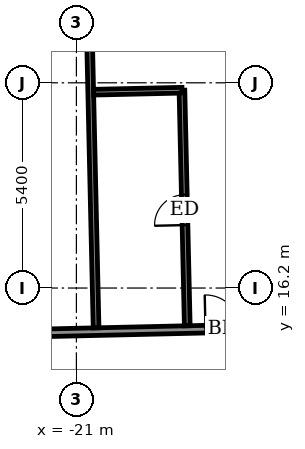
"""IFC4 building model, lengths in metres.
Left out: names, types, materials, properties, quantities, classifications, styles, units other than length and angle.
Written with IfcOpenShell. Run it as: python <this file> out.ifc"""

import sys

from ifc_helpers import new_model, si_unit, direction, frame, frame_2d, origin, place, context, subcontext, project, spatial, rectangle, extrude, element, fill, save


model = new_model("IFC4")
c1 = context("Model", 3, precision=1e-05, world=origin(), true_north=direction((0.0, 1.0)))
c2 = subcontext(c1, "Body", "Model", "MODEL_VIEW")
j1 = project(units=[si_unit("LENGTHUNIT", "METRE"), si_unit("PLANEANGLEUNIT", "RADIAN")], contexts=[c1])
p1 = place(None, origin())
s1 = spatial("IfcSite", under=j1, at=p1, CompositionType="ELEMENT")
p2 = place(p1, origin())
s2 = spatial("IfcBuilding", under=s1, at=p2, CompositionType="ELEMENT")
p3 = place(p2, frame((0.0, 0.0, 290.7)))
s3 = spatial("IfcBuildingStorey", under=s2, at=p3, CompositionType="ELEMENT", Elevation=290.7)
p4 = place(p3, frame((-26.401, 14.918, 0.0), z_axis=(0.0, 0.0, 1.0), x_axis=(0.99974239733, 0.022696673341, 0.0)))
e1 = element("IfcWall", 1, at=p4, inside=s3, PredefinedType="PARTITIONING", context=c2, shape_type="SweptSolid", body=[
    extrude(rectangle(XDim=55.386, YDim=0.2, at=frame_2d((27.693, 0.0))), origin(), (0.0, 0.0, 1.0), 3.05),
])
p5 = place(p4, frame((53.718, 0.0, 0.0)))
e2 = element("IfcOpeningElement", 2, at=p5, cuts=e1, PredefinedType="OPENING", context=c2, shape_type="SweptSolid", body=[
    extrude(rectangle(XDim=1.0, YDim=2.1, at=frame_2d((0.5, 1.05))), frame((0.0, 0.11, 0.0), z_axis=(0.0, -1.0, 0.0), x_axis=(1.0, 0.0, 0.0)), (0.0, 0.0, 1.0), 0.22),
])
p6 = place(p4, frame((49.325, 0.0, 0.0)))
e3 = element("IfcOpeningElement", 3, at=p6, cuts=e1, PredefinedType="OPENING", context=c2, shape_type="SweptSolid", body=[
    extrude(rectangle(XDim=0.9, YDim=2.1, at=frame_2d((0.45, 1.05))), frame((0.0, 0.11, 0.0), z_axis=(0.0, -1.0, 0.0), x_axis=(1.0, 0.0, 0.0)), (0.0, 0.0, 1.0), 0.22),
])
p7 = place(p4, frame((44.575, 0.0, 0.0)))
e4 = element("IfcOpeningElement", 4, at=p7, cuts=e1, PredefinedType="OPENING", context=c2, shape_type="SweptSolid", body=[
    extrude(rectangle(XDim=0.9, YDim=2.1, at=frame_2d((0.45, 1.05))), frame((0.0, 0.11, 0.0), z_axis=(0.0, -1.0, 0.0), x_axis=(1.0, 0.0, 0.0)), (0.0, 0.0, 1.0), 0.22),
])
p8 = place(p4, frame((42.725, 0.0, 0.0)))
e5 = element("IfcOpeningElement", 5, at=p8, cuts=e1, PredefinedType="OPENING", context=c2, shape_type="SweptSolid", body=[
    extrude(rectangle(XDim=0.9, YDim=2.1, at=frame_2d((0.45, 1.05))), frame((0.0, 0.11, 0.0), z_axis=(0.0, -1.0, 0.0), x_axis=(1.0, 0.0, 0.0)), (0.0, 0.0, 1.0), 0.22),
])
p9 = place(p4, frame((36.1, 0.0, 0.0)))
e6 = element("IfcOpeningElement", 6, at=p9, cuts=e1, PredefinedType="OPENING", context=c2, shape_type="SweptSolid", body=[
    extrude(rectangle(XDim=0.9, YDim=2.1, at=frame_2d((0.45, 1.05))), frame((0.0, 0.11, 0.0), z_axis=(0.0, -1.0, 0.0), x_axis=(1.0, 0.0, 0.0)), (0.0, 0.0, 1.0), 0.22),
])
p10 = place(p4, frame((34.25, 0.0, 0.0)))
e7 = element("IfcOpeningElement", 7, at=p10, cuts=e1, PredefinedType="OPENING", context=c2, shape_type="SweptSolid", body=[
    extrude(rectangle(XDim=0.9, YDim=2.1, at=frame_2d((0.45, 1.05))), frame((0.0, 0.11, 0.0), z_axis=(0.0, -1.0, 0.0), x_axis=(1.0, 0.0, 0.0)), (0.0, 0.0, 1.0), 0.22),
])
p11 = place(p4, frame((27.6, 0.0, 0.0)))
e8 = element("IfcOpeningElement", 8, at=p11, cuts=e1, PredefinedType="OPENING", context=c2, shape_type="SweptSolid", body=[
    extrude(rectangle(XDim=0.9, YDim=2.1, at=frame_2d((0.45, 1.05))), frame((0.0, 0.11, 0.0), z_axis=(0.0, -1.0, 0.0), x_axis=(1.0, 0.0, 0.0)), (0.0, 0.0, 1.0), 0.22),
])
p12 = place(p4, frame((25.775, 0.0, 0.0)))
e9 = element("IfcOpeningElement", 9, at=p12, cuts=e1, PredefinedType="OPENING", context=c2, shape_type="SweptSolid", body=[
    extrude(rectangle(XDim=0.9, YDim=2.1, at=frame_2d((0.45, 1.05))), frame((0.0, 0.11, 0.0), z_axis=(0.0, -1.0, 0.0), x_axis=(1.0, 0.0, 0.0)), (0.0, 0.0, 1.0), 0.22),
])
p13 = place(p4, frame((19.15, 0.0, 0.0)))
e10 = element("IfcOpeningElement", 10, at=p13, cuts=e1, PredefinedType="OPENING", context=c2, shape_type="SweptSolid", body=[
    extrude(rectangle(XDim=0.9, YDim=2.1, at=frame_2d((0.45, 1.05))), frame((0.0, 0.11, 0.0), z_axis=(0.0, -1.0, 0.0), x_axis=(1.0, 0.0, 0.0)), (0.0, 0.0, 1.0), 0.22),
])
p14 = place(p4, frame((17.3, 0.0, 0.0)))
e11 = element("IfcOpeningElement", 11, at=p14, cuts=e1, PredefinedType="OPENING", context=c2, shape_type="SweptSolid", body=[
    extrude(rectangle(XDim=0.9, YDim=2.1, at=frame_2d((0.45, 1.05))), frame((0.0, 0.11, 0.0), z_axis=(0.0, -1.0, 0.0), x_axis=(1.0, 0.0, 0.0)), (0.0, 0.0, 1.0), 0.22),
])
p15 = place(p4, frame((10.65, 0.0, 0.0)))
e12 = element("IfcOpeningElement", 12, at=p15, cuts=e1, PredefinedType="OPENING", context=c2, shape_type="SweptSolid", body=[
    extrude(rectangle(XDim=0.9, YDim=2.1, at=frame_2d((0.45, 1.05))), frame((0.0, 0.11, 0.0), z_axis=(0.0, -1.0, 0.0), x_axis=(1.0, 0.0, 0.0)), (0.0, 0.0, 1.0), 0.22),
])
p16 = place(p4, frame((8.8, 0.0, 0.0)))
e13 = element("IfcOpeningElement", 13, at=p16, cuts=e1, PredefinedType="OPENING", context=c2, shape_type="SweptSolid", body=[
    extrude(rectangle(XDim=0.9, YDim=2.1, at=frame_2d((0.45, 1.05))), frame((0.0, 0.11, 0.0), z_axis=(0.0, -1.0, 0.0), x_axis=(1.0, 0.0, 0.0)), (0.0, 0.0, 1.0), 0.22),
])
p17 = place(p4, frame((1.864, 0.0, 0.0)))
e14 = element("IfcOpeningElement", 14, at=p17, cuts=e1, PredefinedType="OPENING", context=c2, shape_type="SweptSolid", body=[
    extrude(rectangle(XDim=1.0, YDim=2.1, at=frame_2d((0.5, 1.05))), frame((0.0, 0.11, 0.0), z_axis=(0.0, -1.0, 0.0), x_axis=(1.0, 0.0, 0.0)), (0.0, 0.0, 1.0), 0.22),
])
p18 = place(p3, frame((-20.482, 15.152, 0.0), z_axis=(0.0, 0.0, 1.0), x_axis=(-0.022737445516, 0.999741470867, 0.0)))
e15 = element("IfcWall", 15, at=p18, inside=s3, PredefinedType="PARTITIONING", context=c2, shape_type="SweptSolid", body=[
    extrude(rectangle(XDim=12.101, YDim=0.15, at=frame_2d((6.051, 0.0))), origin(), (0.0, 0.0, 1.0), 2.55),
])
p19 = place(p3, frame((-18.083, 15.207, 0.0), z_axis=(0.0, 0.0, 1.0), x_axis=(-0.022564860101, 0.999745381129, 0.0)))
e16 = element("IfcWall", 16, at=p19, inside=s3, PredefinedType="PARTITIONING", context=c2, shape_type="SweptSolid", body=[
    extrude(rectangle(XDim=6.199, YDim=0.15, at=frame_2d((3.1, 0.0))), origin(), (0.0, 0.0, 1.0), 3.05),
])
p20 = place(p19, frame((2.65, 0.0, 0.0)))
e17 = element("IfcOpeningElement", 17, at=p20, cuts=e16, PredefinedType="OPENING", context=c2, shape_type="SweptSolid", body=[
    extrude(rectangle(XDim=0.8, YDim=2.1, at=frame_2d((0.4, 1.05))), frame((0.0, 0.085, 0.0), z_axis=(0.0, -1.0, 0.0), x_axis=(1.0, 0.0, 0.0)), (0.0, 0.0, 1.0), 0.17),
])
p21 = place(p3, frame((-20.546, 21.353, 0.0), z_axis=(0.0, 0.0, 1.0), x_axis=(0.999749954681, 0.022361308448, 0.0)))
e18 = element("IfcWall", 18, at=p21, inside=s3, PredefinedType="PARTITIONING", context=c2, shape_type="SweptSolid", body=[
    extrude(rectangle(XDim=2.325, YDim=0.15, at=frame_2d((1.163, 0.0))), origin(), (0.0, 0.0, 1.0), 3.05),
])
p22 = place(p16, origin())
e19 = element("IfcDoor", 19, at=p22, inside=s3, OperationType="SINGLE_SWING_LEFT", PredefinedType="DOOR", context=c2, shape_type="SweptSolid", body=[
    extrude(rectangle(XDim=0.9, YDim=2.1, at=frame_2d((0.45, 1.05))), frame((0.0, 0.025, 0.0), z_axis=(0.0, -1.0, 0.0), x_axis=(1.0, 0.0, 0.0)), (0.0, 0.0, 1.0), 0.05),
])
fill(e13, e19)
p23 = place(p20, origin())
e20 = element("IfcDoor", 20, at=p23, inside=s3, OperationType="SINGLE_SWING_LEFT", PredefinedType="DOOR", context=c2, shape_type="SweptSolid", body=[
    extrude(rectangle(XDim=0.8, YDim=2.1, at=frame_2d((0.4, 1.05))), frame((0.0, 0.025, 0.0), z_axis=(0.0, -1.0, 0.0), x_axis=(1.0, 0.0, 0.0)), (0.0, 0.0, 1.0), 0.05),
])
fill(e17, e20)
save(model, sys.argv[1])
